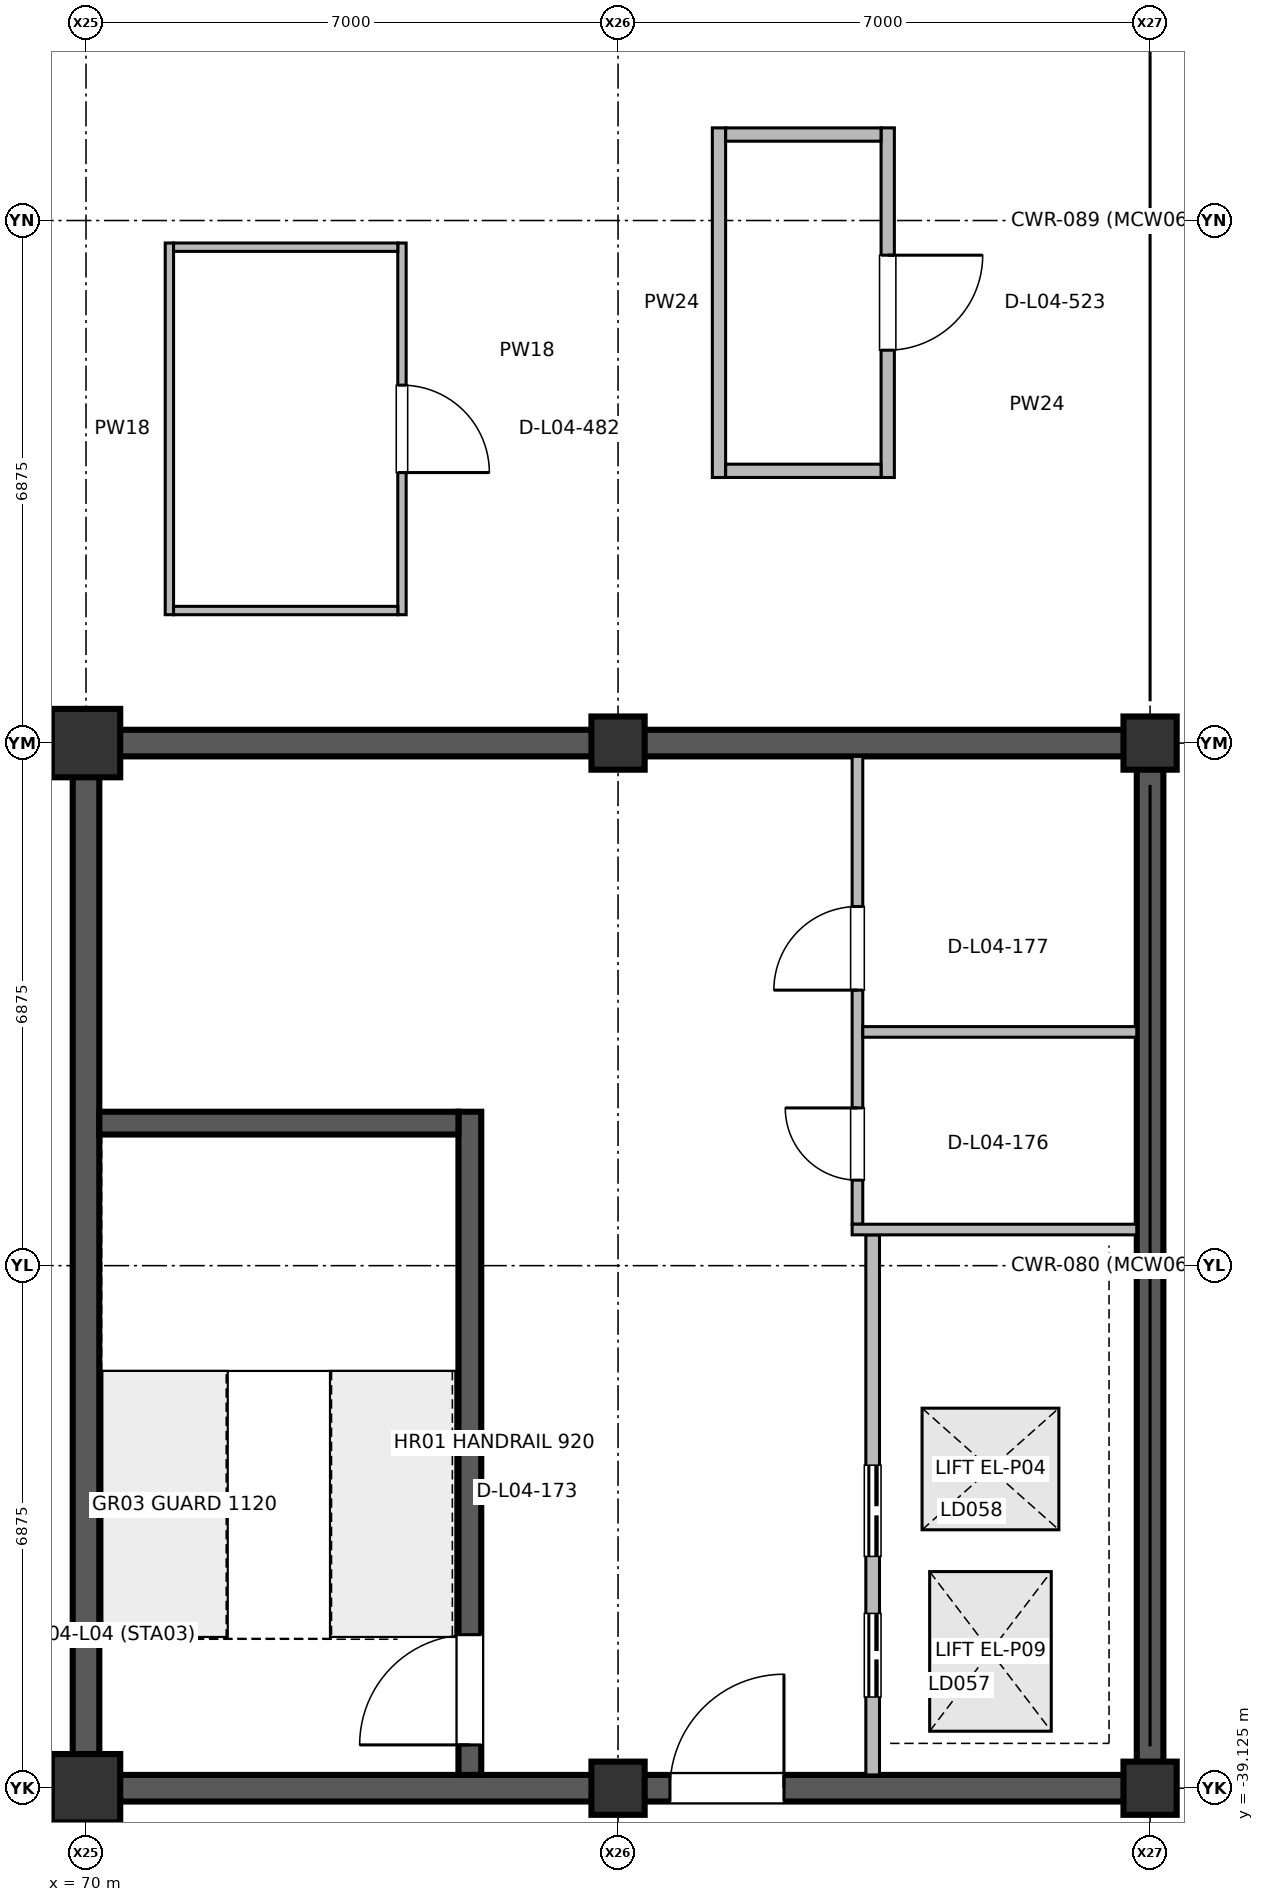
"""IFC4 building model, lengths in metres.
Left out: names, types, materials, properties, quantities, classifications, styles, units other than length and angle.
Written with IfcOpenShell. Run it as: python <this file> out.ifc"""

import sys

from ifc_helpers import new_model, si_unit, direction, frame, frame_2d, origin, origin_2d, place, context, subcontext, project, spatial, rectangle, extrude, element, fill, save


model = new_model("IFC4")
c1 = context("Model", 3, precision=1e-05, world=origin(), true_north=direction((0.0, 1.0)))
c2 = subcontext(c1, "Body", "Model", "MODEL_VIEW")
j1 = project(units=[si_unit("LENGTHUNIT", "METRE"), si_unit("PLANEANGLEUNIT", "RADIAN")], contexts=[c1])
p1 = place(None, origin())
s1 = spatial("IfcSite", under=j1, at=p1, CompositionType="ELEMENT")
p2 = place(p1, origin())
s2 = spatial("IfcBuilding", under=s1, at=p2, CompositionType="ELEMENT")
p3 = place(p2, frame((0.0, 0.0, 16.2)))
s3 = spatial("IfcBuildingStorey", under=s2, at=p3, CompositionType="ELEMENT", Elevation=16.2)
for number, where, z_axis, x_axis in (
    (1, (70.0, -39.125, 0.0), (0.0, 0.0, 1.0), (1.0, 0.0, 0.0)),
    (2, (70.0, -25.375, 0.0), (0.0, 0.0, 1.0), (1.0, 0.0, 0.0)),
):
    element("IfcColumn", number, at=place(p3, frame(where, z_axis=z_axis, x_axis=x_axis)), inside=s3, PredefinedType="COLUMN", context=c2, shape_type="SweptSolid", body=[
        extrude(rectangle(XDim=0.9, YDim=0.9, at=origin_2d()), origin(), (0.0, 0.0, 1.0), 4.798),
    ])
for number, where, z_axis, x_axis in (
    (3, (77.0, -39.125, 0.0), (0.0, 0.0, 1.0), (1.0, 0.0, 0.0)),
    (4, (77.0, -25.375, 0.0), (0.0, 0.0, 1.0), (1.0, 0.0, 0.0)),
):
    element("IfcColumn", number, at=place(p3, frame(where, z_axis=z_axis, x_axis=x_axis)), inside=s3, PredefinedType="COLUMN", context=c2, shape_type="SweptSolid", body=[
        extrude(rectangle(XDim=0.7, YDim=0.7, at=origin_2d()), origin(), (0.0, 0.0, 1.0), 4.6),
    ])
for number, where, z_axis, x_axis in (
    (5, (84.0, -39.125, 0.0), (0.0, 0.0, 1.0), (1.0, 0.0, 0.0)),
    (6, (84.0, -25.375, 0.0), (0.0, 0.0, 1.0), (1.0, 0.0, 0.0)),
):
    element("IfcColumn", number, at=place(p3, frame(where, z_axis=z_axis, x_axis=x_axis)), inside=s3, PredefinedType="COLUMN", context=c2, shape_type="SweptSolid", body=[
        extrude(rectangle(XDim=0.7, YDim=0.7, at=origin_2d()), origin(), (0.0, 0.0, 1.0), 4.798),
    ])
for number, where, z_axis, x_axis in (
    (7, (70.0, -38.95, 0.0), (0.0, 0.0, 1.0), (0.0, 1.0, 0.0)),
    (8, (84.0, -38.95, 0.0), (0.0, 0.0, 1.0), (0.0, 1.0, 0.0)),
):
    element("IfcWall", number, at=place(p3, frame(where, z_axis=z_axis, x_axis=x_axis)), inside=s3, PredefinedType="SHEAR", context=c2, shape_type="SweptSolid", body=[
        extrude(rectangle(XDim=13.4, YDim=0.35, at=frame_2d((6.7, 0.0))), origin(), (0.0, 0.0, 1.0), 4.6),
    ])
p4 = place(p3, frame((70.175, -39.125, 0.0), z_axis=(0.0, 0.0, 1.0), x_axis=(1.0, 0.0, 0.0)))
e9 = element("IfcWall", 9, at=p4, inside=s3, PredefinedType="SHEAR", context=c2, shape_type="SweptSolid", body=[
    extrude(rectangle(XDim=13.65, YDim=0.35, at=frame_2d((6.825, 0.0))), origin(), (0.0, 0.0, 1.0), 4.6),
])
p5 = place(p4, frame((7.508, 0.0, 0.0)))
e10 = element("IfcOpeningElement", 10, at=p5, cuts=e9, PredefinedType="OPENING", context=c2, shape_type="SweptSolid", body=[
    extrude(rectangle(XDim=1.5, YDim=2.2, at=frame_2d((0.75, 1.1))), frame((0.0, 0.185, 0.0), z_axis=(0.0, -1.0, 0.0), x_axis=(1.0, 0.0, 0.0)), (0.0, 0.0, 1.0), 0.37),
])
p6 = place(p3, frame((70.175, -25.375, 0.0), z_axis=(0.0, 0.0, 1.0), x_axis=(1.0, 0.0, 0.0)))
e11 = element("IfcWall", 11, at=p6, inside=s3, PredefinedType="SHEAR", context=c2, shape_type="SweptSolid", body=[
    extrude(rectangle(XDim=13.65, YDim=0.35, at=frame_2d((6.825, 0.0))), origin(), (0.0, 0.0, 1.0), 4.6),
])
p7 = place(p3, frame((75.05, -38.95, 0.0), z_axis=(0.0, 0.0, 1.0), x_axis=(0.0, 1.0, 0.0)))
e12 = element("IfcWall", 12, at=p7, inside=s3, PredefinedType="SHEAR", context=c2, shape_type="SweptSolid", body=[
    extrude(rectangle(XDim=8.725, YDim=0.3, at=frame_2d((4.362, 0.0))), origin(), (0.0, 0.0, 1.0), 4.6),
])
p8 = place(p7, frame((0.395, 0.0, 0.0)))
e13 = element("IfcOpeningElement", 13, at=p8, cuts=e12, PredefinedType="OPENING", context=c2, shape_type="SweptSolid", body=[
    extrude(rectangle(XDim=1.45, YDim=2.2, at=frame_2d((0.725, 1.1))), frame((0.0, 0.16, 0.0), z_axis=(0.0, -1.0, 0.0), x_axis=(1.0, 0.0, 0.0)), (0.0, 0.0, 1.0), 0.32),
])
p9 = place(p3, frame((80.35, -38.95, 0.0), z_axis=(0.0, 0.0, 1.0), x_axis=(0.0, 1.0, 0.0)))
e14 = element("IfcWall", 14, at=p9, inside=s3, PredefinedType="PARTITIONING", context=c2, shape_type="SweptSolid", body=[
    extrude(rectangle(XDim=7.105, YDim=0.18, at=frame_2d((3.552, 0.0))), origin(), (0.0, 0.0, 1.0), 3.82),
])
p10 = place(p9, frame((1.025, 0.0, 0.0)))
e15 = element("IfcOpeningElement", 15, at=p10, cuts=e14, PredefinedType="OPENING", context=c2, shape_type="SweptSolid", body=[
    extrude(rectangle(XDim=1.1, YDim=2.2, at=frame_2d((0.55, 1.1))), frame((0.0, 0.1, 0.0), z_axis=(0.0, -1.0, 0.0), x_axis=(1.0, 0.0, 0.0)), (0.0, 0.0, 1.0), 0.2),
])
p11 = place(p9, frame((2.875, 0.0, 0.0)))
e16 = element("IfcOpeningElement", 16, at=p11, cuts=e14, PredefinedType="OPENING", context=c2, shape_type="SweptSolid", body=[
    extrude(rectangle(XDim=1.2, YDim=2.25, at=frame_2d((0.6, 1.125))), frame((0.0, 0.1, 0.0), z_axis=(0.0, -1.0, 0.0), x_axis=(1.0, 0.0, 0.0)), (0.0, 0.0, 1.0), 0.2),
])
p12 = place(p3, frame((80.15, -31.705, 0.0), z_axis=(0.0, 0.0, 1.0), x_axis=(0.0, 1.0, 0.0)))
e17 = element("IfcWall", 17, at=p12, inside=s3, PredefinedType="PARTITIONING", context=c2, shape_type="SweptSolid", body=[
    extrude(rectangle(XDim=6.155, YDim=0.14, at=frame_2d((3.078, 0.0))), origin(), (0.0, 0.0, 1.0), 3.82),
])
p13 = place(p12, frame((0.58, 0.0, 0.0)))
e18 = element("IfcOpeningElement", 18, at=p13, cuts=e17, PredefinedType="OPENING", context=c2, shape_type="SweptSolid", body=[
    extrude(rectangle(XDim=0.95, YDim=2.15, at=frame_2d((0.475, 1.075))), frame((0.0, 0.08, 0.0), z_axis=(0.0, -1.0, 0.0), x_axis=(1.0, 0.0, 0.0)), (0.0, 0.0, 1.0), 0.16),
])
p14 = place(p12, frame((3.08, 0.0, 0.0)))
e19 = element("IfcOpeningElement", 19, at=p14, cuts=e17, PredefinedType="OPENING", context=c2, shape_type="SweptSolid", body=[
    extrude(rectangle(XDim=1.1, YDim=2.15, at=frame_2d((0.55, 1.075))), frame((0.0, 0.08, 0.0), z_axis=(0.0, -1.0, 0.0), x_axis=(1.0, 0.0, 0.0)), (0.0, 0.0, 1.0), 0.16),
])
p15 = place(p3, frame((74.157, -18.796, 0.0), z_axis=(0.0, 0.0, 1.0), x_axis=(0.0, -1.0, 0.0)))
e20 = element("IfcWall", 20, at=p15, inside=s3, PredefinedType="PARTITIONING", context=c2, shape_type="SweptSolid", body=[
    extrude(rectangle(XDim=4.89, YDim=0.11, at=frame_2d((2.445, 0.0))), origin(), (0.0, 0.0, 1.0), 3.82),
])
p16 = place(p15, frame((1.87, 0.0, 0.0)))
e21 = element("IfcOpeningElement", 21, at=p16, cuts=e20, PredefinedType="OPENING", context=c2, shape_type="SweptSolid", body=[
    extrude(rectangle(XDim=1.15, YDim=2.2, at=frame_2d((0.575, 1.1))), frame((0.0, 0.065, 0.0), z_axis=(0.0, -1.0, 0.0), x_axis=(1.0, 0.0, 0.0)), (0.0, 0.0, 1.0), 0.13),
])
p17 = place(p3, frame((80.548, -17.281, 0.0), z_axis=(0.0, 0.0, 1.0), x_axis=(0.0, -1.0, 0.0)))
e22 = element("IfcWall", 22, at=p17, inside=s3, PredefinedType="PARTITIONING", context=c2, shape_type="SweptSolid", body=[
    extrude(rectangle(XDim=4.6, YDim=0.175, at=frame_2d((2.3, 0.0))), origin(), (0.0, 0.0, 1.0), 3.82),
])
p18 = place(p17, frame((1.675, 0.0, 0.0)))
e23 = element("IfcOpeningElement", 23, at=p18, cuts=e22, PredefinedType="OPENING", context=c2, shape_type="SweptSolid", body=[
    extrude(rectangle(XDim=1.25, YDim=2.2, at=frame_2d((0.625, 1.1))), frame((0.0, 0.097, 0.0), z_axis=(0.0, -1.0, 0.0), x_axis=(1.0, 0.0, 0.0)), (0.0, 0.0, 1.0), 0.195),
])
p19 = place(p3, frame((80.08, -31.775, 0.0), z_axis=(0.0, 0.0, 1.0), x_axis=(1.0, 0.0, 0.0)))
e24 = element("IfcWall", 24, at=p19, inside=s3, PredefinedType="PARTITIONING", context=c2, shape_type="SweptSolid", body=[
    extrude(rectangle(XDim=3.745, YDim=0.14, at=frame_2d((1.873, 0.0))), origin(), (0.0, 0.0, 1.0), 3.82),
])
p20 = place(p3, frame((80.22, -29.175, 0.0), z_axis=(0.0, 0.0, 1.0), x_axis=(1.0, 0.0, 0.0)))
e25 = element("IfcWall", 25, at=p20, inside=s3, PredefinedType="PARTITIONING", context=c2, shape_type="SweptSolid", body=[
    extrude(rectangle(XDim=3.605, YDim=0.14, at=frame_2d((1.802, 0.0))), origin(), (0.0, 0.0, 1.0), 3.82),
])
p21 = place(p3, frame((71.097, -23.686, 0.0), z_axis=(0.0, 0.0, 1.0), x_axis=(0.0, 1.0, 0.0)))
e26 = element("IfcWall", 26, at=p21, inside=s3, PredefinedType="PARTITIONING", context=c2, shape_type="SweptSolid", body=[
    extrude(rectangle(XDim=4.89, YDim=0.11, at=frame_2d((2.445, 0.0))), origin(), (0.0, 0.0, 1.0), 3.82),
])
for number, where, z_axis, x_axis in (
    (27, (71.152, -23.631, 0.0), (0.0, 0.0, 1.0), (1.0, 0.0, 0.0)),
    (28, (71.152, -18.851, 0.0), (0.0, 0.0, 1.0), (1.0, 0.0, 0.0)),
):
    element("IfcWall", number, at=place(p3, frame(where, z_axis=z_axis, x_axis=x_axis)), inside=s3, PredefinedType="PARTITIONING", context=c2, shape_type="SweptSolid", body=[
        extrude(rectangle(XDim=2.95, YDim=0.11, at=frame_2d((1.475, 0.0))), origin(), (0.0, 0.0, 1.0), 3.82),
    ])
p22 = place(p3, frame((78.328, -21.881, 0.0), z_axis=(0.0, 0.0, 1.0), x_axis=(0.0, 1.0, 0.0)))
e29 = element("IfcWall", 29, at=p22, inside=s3, PredefinedType="PARTITIONING", context=c2, shape_type="SweptSolid", body=[
    extrude(rectangle(XDim=4.6, YDim=0.175, at=frame_2d((2.3, 0.0))), origin(), (0.0, 0.0, 1.0), 3.82),
])
for number, where, z_axis, x_axis in (
    (30, (78.416, -21.793, 0.0), (0.0, 0.0, 1.0), (1.0, 0.0, 0.0)),
    (31, (78.416, -17.369, 0.0), (0.0, 0.0, 1.0), (1.0, 0.0, 0.0)),
):
    element("IfcWall", number, at=place(p3, frame(where, z_axis=z_axis, x_axis=x_axis)), inside=s3, PredefinedType="PARTITIONING", context=c2, shape_type="SweptSolid", body=[
        extrude(rectangle(XDim=2.044, YDim=0.175, at=frame_2d((1.022, 0.0))), origin(), (0.0, 0.0, 1.0), 3.82),
    ])
p23 = place(p3, frame((70.175, -30.375, 0.0), z_axis=(0.0, 0.0, 1.0), x_axis=(1.0, 0.0, 0.0)))
e32 = element("IfcWall", 32, at=p23, inside=s3, PredefinedType="SHEAR", context=c2, shape_type="SweptSolid", body=[
    extrude(rectangle(XDim=4.725, YDim=0.3, at=frame_2d((2.362, 0.0))), origin(), (0.0, 0.0, 1.0), 4.6),
])
p24 = place(p5, origin())
e33 = element("IfcDoor", 33, at=p24, inside=s3, OperationType="SINGLE_SWING_RIGHT", PredefinedType="DOOR", context=c2, shape_type="SweptSolid", body=[
    extrude(rectangle(XDim=1.5, YDim=2.2, at=frame_2d((0.75, 1.1))), frame((0.0, 0.025, 0.0), z_axis=(0.0, -1.0, 0.0), x_axis=(1.0, 0.0, 0.0)), (0.0, 0.0, 1.0), 0.05),
])
fill(e10, e33)
p25 = place(p8, origin())
e34 = element("IfcDoor", 34, at=p25, inside=s3, OperationType="SINGLE_SWING_LEFT", PredefinedType="DOOR", context=c2, shape_type="SweptSolid", body=[
    extrude(rectangle(XDim=1.45, YDim=2.2, at=frame_2d((0.725, 1.1))), frame((0.0, 0.025, 0.0), z_axis=(0.0, -1.0, 0.0), x_axis=(1.0, 0.0, 0.0)), (0.0, 0.0, 1.0), 0.05),
])
fill(e13, e34)
p26 = place(p10, origin())
e35 = element("IfcDoor", 35, at=p26, inside=s3, OperationType="DOUBLE_DOOR_SLIDING", PredefinedType="DOOR", context=c2, shape_type="SweptSolid", body=[
    extrude(rectangle(XDim=1.1, YDim=2.2, at=frame_2d((0.55, 1.1))), frame((0.0, 0.025, 0.0), z_axis=(0.0, -1.0, 0.0), x_axis=(1.0, 0.0, 0.0)), (0.0, 0.0, 1.0), 0.05),
])
fill(e15, e35)
p27 = place(p11, origin())
e36 = element("IfcDoor", 36, at=p27, inside=s3, OperationType="DOUBLE_DOOR_SLIDING", PredefinedType="DOOR", context=c2, shape_type="SweptSolid", body=[
    extrude(rectangle(XDim=1.2, YDim=2.25, at=frame_2d((0.6, 1.125))), frame((0.0, 0.025, 0.0), z_axis=(0.0, -1.0, 0.0), x_axis=(1.0, 0.0, 0.0)), (0.0, 0.0, 1.0), 0.05),
])
fill(e16, e36)
p28 = place(p13, origin())
e37 = element("IfcDoor", 37, at=p28, inside=s3, OperationType="SINGLE_SWING_RIGHT", PredefinedType="DOOR", context=c2, shape_type="SweptSolid", body=[
    extrude(rectangle(XDim=0.95, YDim=2.15, at=frame_2d((0.475, 1.075))), frame((0.0, 0.025, 0.0), z_axis=(0.0, -1.0, 0.0), x_axis=(1.0, 0.0, 0.0)), (0.0, 0.0, 1.0), 0.05),
])
fill(e18, e37)
p29 = place(p14, origin())
e38 = element("IfcDoor", 38, at=p29, inside=s3, OperationType="SINGLE_SWING_LEFT", PredefinedType="DOOR", context=c2, shape_type="SweptSolid", body=[
    extrude(rectangle(XDim=1.1, YDim=2.15, at=frame_2d((0.55, 1.075))), frame((0.0, 0.025, 0.0), z_axis=(0.0, -1.0, 0.0), x_axis=(1.0, 0.0, 0.0)), (0.0, 0.0, 1.0), 0.05),
])
fill(e19, e38)
p30 = place(p16, origin())
e39 = element("IfcDoor", 39, at=p30, inside=s3, OperationType="SINGLE_SWING_RIGHT", PredefinedType="DOOR", context=c2, shape_type="SweptSolid", body=[
    extrude(rectangle(XDim=1.15, YDim=2.2, at=frame_2d((0.575, 1.1))), frame((0.0, 0.025, 0.0), z_axis=(0.0, -1.0, 0.0), x_axis=(1.0, 0.0, 0.0)), (0.0, 0.0, 1.0), 0.05),
])
fill(e21, e39)
p31 = place(p18, origin())
e40 = element("IfcDoor", 40, at=p31, inside=s3, OperationType="SINGLE_SWING_LEFT", PredefinedType="DOOR", context=c2, shape_type="SweptSolid", body=[
    extrude(rectangle(XDim=1.25, YDim=2.2, at=frame_2d((0.625, 1.1))), frame((0.0, 0.025, 0.0), z_axis=(0.0, -1.0, 0.0), x_axis=(1.0, 0.0, 0.0)), (0.0, 0.0, 1.0), 0.05),
])
fill(e23, e40)
save(model, sys.argv[1])
